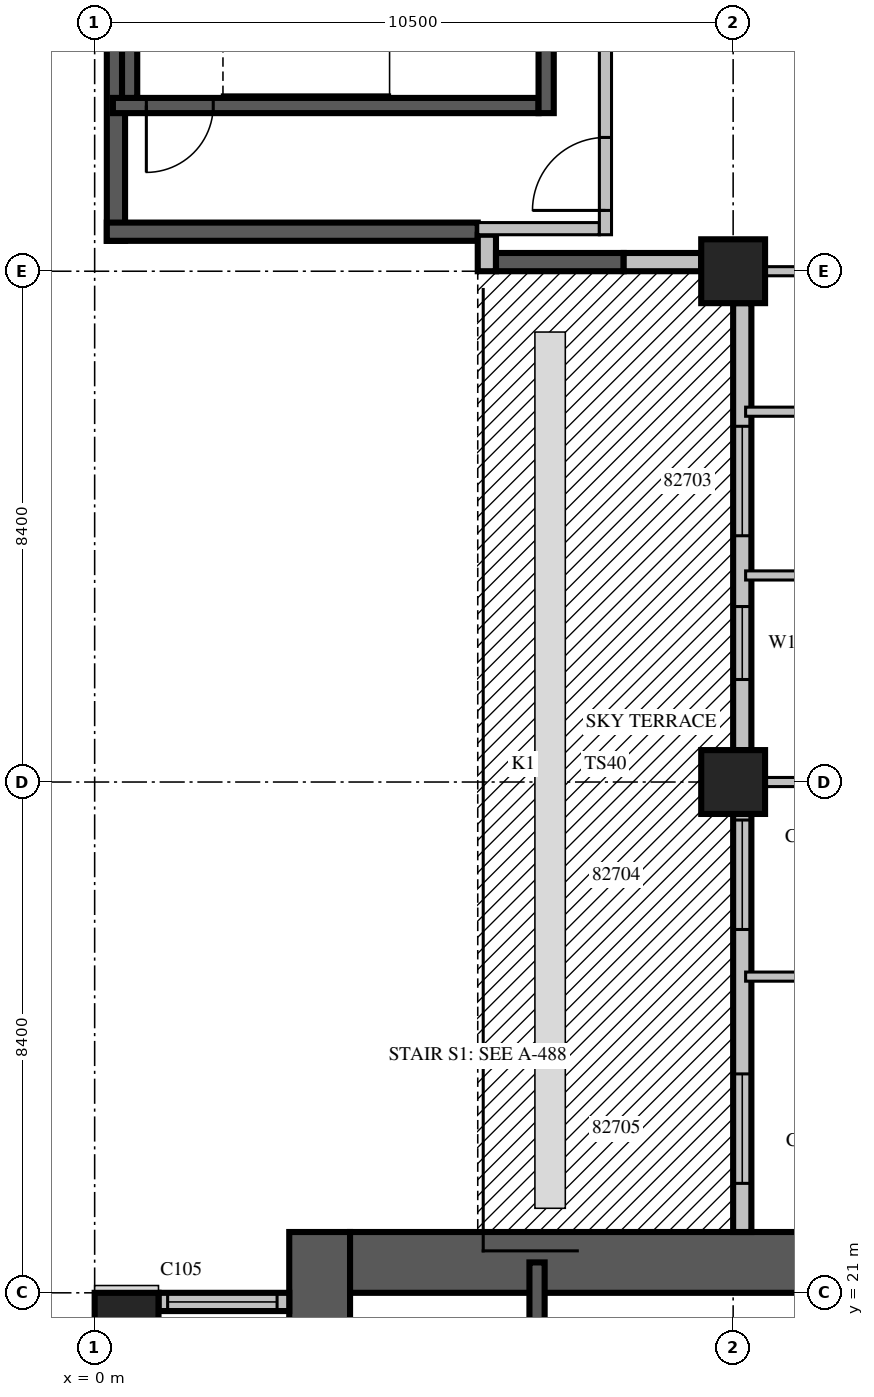
"""IFC4 building model, lengths in metres.
Left out: names, types, materials, properties, quantities, classifications, styles, units other than length and angle.
Written with IfcOpenShell. Run it as: python <this file> out.ifc"""

import sys

from ifc_helpers import new_model, si_unit, direction, frame, frame_2d, origin, origin_2d, place, context, subcontext, project, spatial, rectangle, extrude, source, transform, mapped, element, fill, save


model = new_model("IFC4")
c1 = context("Model", 3, precision=1e-05, world=origin(), true_north=direction((0.0, 1.0)))
c2 = subcontext(c1, "Body", "Model", "MODEL_VIEW")
j1 = project(units=[si_unit("LENGTHUNIT", "METRE"), si_unit("PLANEANGLEUNIT", "RADIAN")], contexts=[c1])
p1 = place(None, origin())
s1 = spatial("IfcSite", under=j1, at=p1, CompositionType="ELEMENT")
p2 = place(p1, origin())
s2 = spatial("IfcBuilding", under=s1, at=p2, CompositionType="ELEMENT")
p3 = place(p2, frame((0.0, 0.0, 124.5)))
s3 = spatial("IfcBuildingStorey", under=s2, at=p3, CompositionType="ELEMENT", Elevation=124.5)
m1 = source(origin(), c2, "Body", "SweptSolid", [
    extrude(rectangle(XDim=1.05, YDim=1.05, at=origin_2d()), origin(), (0.0, 0.0, 1.0), 4.2),
])
for number, where, z_axis, x_axis in (
    (1, (0.525, 20.475, 0.0), (0.0, 0.0, 1.0), (1.0, 0.0, 0.0)),
    (2, (10.5, 29.4, 0.0), (0.0, 0.0, 1.0), (1.0, 0.0, 0.0)),
    (3, (10.5, 37.8, 0.0), (0.0, 0.0, 1.0), (1.0, 0.0, 0.0)),
):
    element("IfcColumn", number, at=place(p3, frame(where, z_axis=z_axis, x_axis=x_axis)), inside=s3, PredefinedType="COLUMN", context=c2, shape_type="MappedRepresentation", body=[
        mapped(m1, transform((0.0, 0.0, 0.0), scale=1.0)),
    ])
m2 = source(origin(), c2, "Body", "SweptSolid", [
    extrude(rectangle(XDim=17.8, YDim=1.0, at=frame_2d((8.9, 0.0))), origin(), (0.0, 0.0, 1.0), 4.2),
])
p4 = place(p3, frame((3.7, 4.2, 0.0), z_axis=(0.0, 0.0, 1.0), x_axis=(0.0, 1.0, 0.0)))
e4 = element("IfcWall", 4, at=p4, inside=s3, PredefinedType="SHEAR", context=c2, shape_type="MappedRepresentation", body=[
    mapped(m2, transform((0.0, 0.0, 0.0), scale=1.0)),
])
m3 = source(origin(), c2, "Body", "SweptSolid", [
    extrude(rectangle(XDim=2.2, YDim=2.1, at=frame_2d((1.1, 1.05))), frame((0.0, 0.51, 0.0), z_axis=(0.0, -1.0, 0.0), x_axis=(1.0, 0.0, 0.0)), (0.0, 0.0, 1.0), 1.02),
])
p5 = place(p4, frame((4.2, 0.0, 0.0)))
e5 = element("IfcOpeningElement", 5, at=p5, cuts=e4, PredefinedType="OPENING", context=c2, shape_type="MappedRepresentation", body=[
    mapped(m3, transform((0.0, 0.0, 0.0), scale=1.0)),
])
m4 = source(origin(), c2, "Body", "SweptSolid", [
    extrude(rectangle(XDim=0.9, YDim=2.1, at=frame_2d((0.45, 1.05))), frame((0.0, 0.51, 0.0), z_axis=(0.0, -1.0, 0.0), x_axis=(1.0, 0.0, 0.0)), (0.0, 0.0, 1.0), 1.02),
])
p6 = place(p4, frame((10.95, 0.0, 0.0)))
e6 = element("IfcOpeningElement", 6, at=p6, cuts=e4, PredefinedType="OPENING", context=c2, shape_type="MappedRepresentation", body=[
    mapped(m4, transform((0.0, 0.0, 0.0), scale=1.0)),
])
m5 = source(origin(), c2, "Body", "SweptSolid", [
    extrude(rectangle(XDim=16.8, YDim=1.0, at=frame_2d((8.4, 0.0))), origin(), (0.0, 0.0, 1.0), 4.2),
])
p7 = place(p3, frame((4.2, 21.5, 0.0), z_axis=(0.0, 0.0, 1.0), x_axis=(1.0, 0.0, 0.0)))
e7 = element("IfcWall", 7, at=p7, inside=s3, PredefinedType="SHEAR", context=c2, shape_type="MappedRepresentation", body=[
    mapped(m5, transform((0.0, 0.0, 0.0), scale=1.0)),
])
m6 = source(origin(), c2, "Body", "SweptSolid", [
    extrude(rectangle(XDim=1.2, YDim=2.1, at=frame_2d((0.6, 1.05))), frame((0.0, 0.51, 0.0), z_axis=(0.0, -1.0, 0.0), x_axis=(1.0, 0.0, 0.0)), (0.0, 0.0, 1.0), 1.02),
])
p8 = place(p7, frame((7.4, 0.0, 0.0)))
e8 = element("IfcOpeningElement", 8, at=p8, cuts=e7, PredefinedType="OPENING", context=c2, shape_type="MappedRepresentation", body=[
    mapped(m6, transform((0.0, 0.0, 0.0), scale=1.0)),
])
m7 = source(origin(), c2, "Body", "SweptSolid", [
    extrude(rectangle(XDim=5.65, YDim=0.3, at=frame_2d((2.825, 0.0))), origin(), (0.0, 0.0, 1.0), 3.8),
])
p9 = place(p3, frame((0.35, 43.95, 0.0), z_axis=(0.0, 0.0, 1.0), x_axis=(0.0, -1.0, 0.0)))
e9 = element("IfcWall", 9, at=p9, inside=s3, PredefinedType="SOLIDWALL", context=c2, shape_type="MappedRepresentation", body=[
    mapped(m7, transform((0.0, 0.0, 0.0), scale=1.0)),
])
m8 = source(origin(), c2, "Body", "SweptSolid", [
    extrude(rectangle(XDim=6.1, YDim=0.3, at=frame_2d((3.05, 0.0))), origin(), (0.0, 0.0, 1.0), 3.8),
])
p10 = place(p3, frame((0.2, 38.45, 0.0), z_axis=(0.0, 0.0, 1.0), x_axis=(1.0, 0.0, 0.0)))
e10 = element("IfcWall", 10, at=p10, inside=s3, PredefinedType="SOLIDWALL", context=c2, shape_type="MappedRepresentation", body=[
    mapped(m8, transform((0.0, 0.0, 0.0), scale=1.0)),
])
p11 = place(p3, frame((6.45, 38.4, 0.0), z_axis=(0.0, 0.0, 1.0), x_axis=(0.0, -1.0, 0.0)))
e11 = element("IfcWall", 11, at=p11, inside=s3, PredefinedType="STANDARD", context=c2, shape_type="SweptSolid", body=[
    extrude(rectangle(XDim=0.6, YDim=0.3, at=frame_2d((0.3, 0.0))), origin(), (0.0, 0.0, 1.0), 3.8),
])
p12 = place(p3, frame((6.6, 37.95, 0.0), z_axis=(0.0, 0.0, 1.0), x_axis=(1.0, 0.0, 0.0)))
e12 = element("IfcWall", 12, at=p12, inside=s3, PredefinedType="SOLIDWALL", context=c2, shape_type="SweptSolid", body=[
    extrude(rectangle(XDim=2.1, YDim=0.3, at=frame_2d((1.05, 0.0))), origin(), (0.0, 0.0, 1.0), 3.8),
])
p13 = place(p3, frame((8.7, 37.95, 0.0), z_axis=(0.0, 0.0, 1.0), x_axis=(1.0, 0.0, 0.0)))
e13 = element("IfcWall", 13, at=p13, inside=s3, PredefinedType="STANDARD", context=c2, shape_type="SweptSolid", body=[
    extrude(rectangle(XDim=1.275, YDim=0.3, at=frame_2d((0.637, 0.0))), origin(), (0.0, 0.0, 1.0), 3.8),
])
m9 = source(origin(), c2, "Body", "SweptSolid", [
    extrude(rectangle(XDim=7.35, YDim=0.3, at=frame_2d((3.675, 0.0))), origin(), (0.0, 0.0, 1.0), 3.8),
])
p14 = place(p3, frame((10.65, 37.275, 0.0), z_axis=(0.0, 0.0, 1.0), x_axis=(0.0, -1.0, 0.0)))
e14 = element("IfcWall", 14, at=p14, inside=s3, PredefinedType="STANDARD", context=c2, shape_type="MappedRepresentation", body=[
    mapped(m9, transform((0.0, 0.0, 0.0), scale=1.0)),
])
m10 = source(origin(), c2, "Body", "SweptSolid", [
    extrude(rectangle(XDim=1.8, YDim=2.4, at=frame_2d((0.9, 1.2))), frame((0.0, 0.16, 0.0), z_axis=(0.0, -1.0, 0.0), x_axis=(1.0, 0.0, 0.0)), (0.0, 0.0, 1.0), 0.32),
])
p15 = place(p14, frame((2.025, 0.0, 0.0)))
e15 = element("IfcOpeningElement", 15, at=p15, cuts=e14, PredefinedType="OPENING", context=c2, shape_type="MappedRepresentation", body=[
    mapped(m10, transform((0.0, 0.0, 0.0), scale=1.0)),
])
m11 = source(origin(), c2, "Body", "SweptSolid", [
    extrude(rectangle(XDim=1.2, YDim=2.7, at=frame_2d((0.6, 1.35))), frame((0.0, 0.16, 0.0), z_axis=(0.0, -1.0, 0.0), x_axis=(1.0, 0.0, 0.0)), (0.0, 0.0, 1.0), 0.32),
])
p16 = place(p14, frame((4.989, 0.0, 0.6)))
e16 = element("IfcOpeningElement", 16, at=p16, cuts=e14, PredefinedType="OPENING", context=c2, shape_type="MappedRepresentation", body=[
    mapped(m11, transform((0.0, 0.0, 0.0), scale=1.0)),
])
m12 = source(origin(), c2, "Body", "SweptSolid", [
    extrude(rectangle(XDim=6.875, YDim=0.3, at=frame_2d((3.438, 0.0))), origin(), (0.0, 0.0, 1.0), 3.8),
])
p17 = place(p3, frame((10.65, 28.875, 0.0), z_axis=(0.0, 0.0, 1.0), x_axis=(0.0, -1.0, 0.0)))
e17 = element("IfcWall", 17, at=p17, inside=s3, PredefinedType="STANDARD", context=c2, shape_type="MappedRepresentation", body=[
    mapped(m12, transform((0.0, 0.0, 0.0), scale=1.0)),
])
p18 = place(p17, frame((0.1, 0.0, 0.0)))
e18 = element("IfcOpeningElement", 18, at=p18, cuts=e17, PredefinedType="OPENING", context=c2, shape_type="MappedRepresentation", body=[
    mapped(m10, transform((0.0, 0.0, 0.0), scale=1.0)),
])
p19 = place(p17, frame((4.275, 0.0, 0.0)))
e19 = element("IfcOpeningElement", 19, at=p19, cuts=e17, PredefinedType="OPENING", context=c2, shape_type="MappedRepresentation", body=[
    mapped(m10, transform((0.0, 0.0, 0.0), scale=1.0)),
])
m13 = source(origin(), c2, "Body", "SweptSolid", [
    extrude(rectangle(XDim=2.15, YDim=0.3, at=frame_2d((1.075, 0.0))), origin(), (0.0, 0.0, 1.0), 3.8),
])
p20 = place(p3, frame((3.2, 20.85, 0.0), z_axis=(0.0, 0.0, 1.0), x_axis=(-1.0, 0.0, 0.0)))
e20 = element("IfcWall", 20, at=p20, inside=s3, PredefinedType="STANDARD", context=c2, shape_type="MappedRepresentation", body=[
    mapped(m13, transform((0.0, 0.0, 0.0), scale=1.0)),
])
m14 = source(origin(), c2, "Body", "SweptSolid", [
    extrude(rectangle(XDim=1.8, YDim=2.7, at=frame_2d((0.9, 1.35))), frame((0.0, 0.16, 0.0), z_axis=(0.0, -1.0, 0.0), x_axis=(1.0, 0.0, 0.0)), (0.0, 0.0, 1.0), 0.32),
])
p21 = place(p20, frame((0.2, 0.0, 0.6)))
e21 = element("IfcOpeningElement", 21, at=p21, cuts=e20, PredefinedType="OPENING", context=c2, shape_type="MappedRepresentation", body=[
    mapped(m14, transform((0.0, 0.0, 0.0), scale=1.0)),
])
m15 = source(origin(), c2, "Body", "SweptSolid", [
    extrude(rectangle(XDim=6.6, YDim=0.25, at=frame_2d((3.3, 0.0))), origin(), (0.0, 0.0, 1.0), 3.8),
])
p22 = place(p3, frame((7.275, 14.9, 0.0), z_axis=(0.0, 0.0, 1.0), x_axis=(0.0, 1.0, 0.0)))
e22 = element("IfcWall", 22, at=p22, inside=s3, PredefinedType="SOLIDWALL", context=c2, shape_type="MappedRepresentation", body=[
    mapped(m15, transform((0.0, 0.0, 0.0), scale=1.0)),
])
m16 = source(origin(), c2, "Body", "SweptSolid", [
    extrude(rectangle(XDim=1.1, YDim=2.1, at=frame_2d((0.55, 1.05))), frame((0.0, 0.135, 0.0), z_axis=(0.0, -1.0, 0.0), x_axis=(1.0, 0.0, 0.0)), (0.0, 0.0, 1.0), 0.27),
])
p23 = place(p22, frame((0.15, 0.0, 0.0)))
e23 = element("IfcOpeningElement", 23, at=p23, cuts=e22, PredefinedType="OPENING", context=c2, shape_type="MappedRepresentation", body=[
    mapped(m16, transform((0.0, 0.0, 0.0), scale=1.0)),
])
m17 = source(origin(), c2, "Body", "SweptSolid", [
    extrude(rectangle(XDim=7.0, YDim=0.25, at=frame_2d((3.5, 0.0))), origin(), (0.0, 0.0, 1.0), 3.8),
])
p24 = place(p3, frame((0.3, 40.525, 0.0), z_axis=(0.0, 0.0, 1.0), x_axis=(1.0, 0.0, 0.0)))
e24 = element("IfcWall", 24, at=p24, inside=s3, PredefinedType="SOLIDWALL", context=c2, shape_type="MappedRepresentation", body=[
    mapped(m17, transform((0.0, 0.0, 0.0), scale=1.0)),
])
p25 = place(p24, frame((0.55, 0.0, 0.0)))
e25 = element("IfcOpeningElement", 25, at=p25, cuts=e24, PredefinedType="OPENING", context=c2, shape_type="MappedRepresentation", body=[
    mapped(m16, transform((0.0, 0.0, 0.0), scale=1.0)),
])
m18 = source(origin(), c2, "Body", "SweptSolid", [
    extrude(rectangle(XDim=3.45, YDim=0.25, at=frame_2d((1.725, 0.0))), origin(), (0.0, 0.0, 1.0), 3.8),
])
p26 = place(p3, frame((7.425, 40.4, 0.0), z_axis=(0.0, 0.0, 1.0), x_axis=(0.0, 1.0, 0.0)))
e26 = element("IfcWall", 26, at=p26, inside=s3, PredefinedType="SOLIDWALL", context=c2, shape_type="MappedRepresentation", body=[
    mapped(m18, transform((0.0, 0.0, 0.0), scale=1.0)),
])
m19 = source(origin(), c2, "Body", "SweptSolid", [
    extrude(rectangle(XDim=2.95, YDim=0.25, at=frame_2d((1.475, 0.0))), origin(), (0.0, 0.0, 1.0), 3.8),
])
p27 = place(p3, frame((0.575, 40.65, 0.0), z_axis=(0.0, 0.0, 1.0), x_axis=(0.0, 1.0, 0.0)))
e27 = element("IfcWall", 27, at=p27, inside=s3, PredefinedType="SOLIDWALL", context=c2, shape_type="MappedRepresentation", body=[
    mapped(m19, transform((0.0, 0.0, 0.0), scale=1.0)),
])
m20 = source(origin(), c2, "Body", "SweptSolid", [
    extrude(rectangle(XDim=2.0, YDim=0.2, at=frame_2d((1.0, 0.0))), origin(), (0.0, 0.0, 1.0), 3.8),
])
p28 = place(p3, frame((6.3, 38.5, 0.0), z_axis=(0.0, 0.0, 1.0), x_axis=(1.0, 0.0, 0.0)))
e28 = element("IfcWall", 28, at=p28, inside=s3, PredefinedType="PARTITIONING", context=c2, shape_type="MappedRepresentation", body=[
    mapped(m20, transform((0.0, 0.0, 0.0), scale=1.0)),
])
m21 = source(origin(), c2, "Body", "SweptSolid", [
    extrude(rectangle(XDim=5.45, YDim=0.2, at=frame_2d((2.725, 0.0))), origin(), (0.0, 0.0, 1.0), 3.8),
])
p29 = place(p3, frame((8.4, 38.4, 0.0), z_axis=(0.0, 0.0, 1.0), x_axis=(0.0, 1.0, 0.0)))
e29 = element("IfcWall", 29, at=p29, inside=s3, PredefinedType="PARTITIONING", context=c2, shape_type="MappedRepresentation", body=[
    mapped(m21, transform((0.0, 0.0, 0.0), scale=1.0)),
])
m22 = source(origin(), c2, "Body", "SweptSolid", [
    extrude(rectangle(XDim=1.2, YDim=2.1, at=frame_2d((0.6, 1.05))), frame((0.0, 0.11, 0.0), z_axis=(0.0, -1.0, 0.0), x_axis=(1.0, 0.0, 0.0)), (0.0, 0.0, 1.0), 0.22),
])
p30 = place(p29, frame((0.4, 0.0, 0.0)))
e30 = element("IfcOpeningElement", 30, at=p30, cuts=e29, PredefinedType="OPENING", context=c2, shape_type="MappedRepresentation", body=[
    mapped(m22, transform((0.0, 0.0, 0.0), scale=1.0)),
])
m23 = source(origin(), c2, "Body", "SweptSolid", [
    extrude(rectangle(XDim=0.9, YDim=2.1, at=frame_2d((0.45, 1.05))), frame((0.0, 0.11, 0.0), z_axis=(0.0, -1.0, 0.0), x_axis=(1.0, 0.0, 0.0)), (0.0, 0.0, 1.0), 0.22),
])
p31 = place(p29, frame((3.25, 0.0, 0.0)))
e31 = element("IfcOpeningElement", 31, at=p31, cuts=e29, PredefinedType="OPENING", context=c2, shape_type="MappedRepresentation", body=[
    mapped(m23, transform((0.0, 0.0, 0.0), scale=1.0)),
])
m24 = source(origin(), c2, "Body", "SweptSolid", [
    extrude(rectangle(XDim=4.295, YDim=0.15, at=frame_2d((2.147, 0.0))), origin(), (0.0, 0.0, 1.0), 3.8),
])
p32 = place(p3, frame((10.705, 26.2, 0.0), z_axis=(0.0, 0.0, 1.0), x_axis=(1.0, 0.0, 0.0)))
e32 = element("IfcWall", 32, at=p32, inside=s3, PredefinedType="PARTITIONING", context=c2, shape_type="MappedRepresentation", body=[
    mapped(m24, transform((0.0, 0.0, 0.0), scale=1.0)),
])
m25 = source(origin(), c2, "Body", "SweptSolid", [
    extrude(rectangle(XDim=0.9, YDim=2.1, at=frame_2d((0.45, 1.05))), frame((0.0, 0.085, 0.0), z_axis=(0.0, -1.0, 0.0), x_axis=(1.0, 0.0, 0.0)), (0.0, 0.0, 1.0), 0.17),
])
p33 = place(p32, frame((2.283, 0.0, 0.0)))
e33 = element("IfcOpeningElement", 33, at=p33, cuts=e32, PredefinedType="OPENING", context=c2, shape_type="MappedRepresentation", body=[
    mapped(m25, transform((0.0, 0.0, 0.0), scale=1.0)),
])
m26 = source(origin(), c2, "Body", "SweptSolid", [
    extrude(rectangle(XDim=3.976, YDim=0.15, at=frame_2d((1.988, 0.0))), origin(), (0.0, 0.0, 1.0), 3.8),
])
p34 = place(p3, frame((15.0, 29.4, 0.0), z_axis=(0.0, 0.0, 1.0), x_axis=(-1.0, 0.0, 0.0)))
e34 = element("IfcWall", 34, at=p34, inside=s3, PredefinedType="PARTITIONING", context=c2, shape_type="MappedRepresentation", body=[
    mapped(m26, transform((0.0, 0.0, 0.0), scale=1.0)),
])
for number, where, z_axis, x_axis in (
    (35, (15.0, 32.797, 0.0), (0.0, 0.0, 1.0), (-1.0, 0.0, 0.0)),
    (36, (15.0, 35.49, 0.0), (0.0, 0.0, 1.0), (-1.0, 0.0, 0.0)),
):
    element("IfcWall", number, at=place(p3, frame(where, z_axis=z_axis, x_axis=x_axis)), inside=s3, PredefinedType="PARTITIONING", context=c2, shape_type="MappedRepresentation", body=[
        mapped(m24, transform((0.0, 0.0, 0.0), scale=1.0)),
    ])
p35 = place(p3, frame((15.0, 37.8, 0.0), z_axis=(0.0, 0.0, 1.0), x_axis=(-1.0, 0.0, 0.0)))
e37 = element("IfcWall", 37, at=p35, inside=s3, PredefinedType="PARTITIONING", context=c2, shape_type="MappedRepresentation", body=[
    mapped(m26, transform((0.0, 0.0, 0.0), scale=1.0)),
])
m27 = source(origin(), c2, "Body", "SweptSolid", [
    extrude(rectangle(XDim=1.8, YDim=2.4, at=frame_2d((0.9, 1.2))), frame((0.0, 0.025, 0.0), z_axis=(0.0, -1.0, 0.0), x_axis=(1.0, 0.0, 0.0)), (0.0, 0.0, 1.0), 0.05),
])
p36 = place(p15, origin())
e38 = element("IfcDoor", 38, at=p36, inside=s3, OperationType="SLIDING_TO_LEFT", PredefinedType="DOOR", context=c2, shape_type="MappedRepresentation", body=[
    mapped(m27, transform((0.0, 0.0, 0.0), scale=1.0)),
])
fill(e15, e38)
m28 = source(origin(), c2, "Body", "SweptSolid", [
    extrude(rectangle(XDim=1.2, YDim=2.7, at=frame_2d((0.6, 1.35))), frame((0.0, 0.03, 0.0), z_axis=(0.0, -1.0, 0.0), x_axis=(1.0, 0.0, 0.0)), (0.0, 0.0, 1.0), 0.06),
])
p37 = place(p16, origin())
e39 = element("IfcWindow", 39, at=p37, inside=s3, PartitioningType="SINGLE_PANEL", PredefinedType="WINDOW", context=c2, shape_type="MappedRepresentation", body=[
    mapped(m28, transform((0.0, 0.0, 0.0), scale=1.0)),
])
fill(e16, e39)
p38 = place(p18, origin())
e40 = element("IfcDoor", 40, at=p38, inside=s3, OperationType="SLIDING_TO_LEFT", PredefinedType="DOOR", context=c2, shape_type="MappedRepresentation", body=[
    mapped(m27, transform((0.0, 0.0, 0.0), scale=1.0)),
])
fill(e18, e40)
p39 = place(p19, origin())
e41 = element("IfcDoor", 41, at=p39, inside=s3, OperationType="SLIDING_TO_LEFT", PredefinedType="DOOR", context=c2, shape_type="MappedRepresentation", body=[
    mapped(m27, transform((0.0, 0.0, 0.0), scale=1.0)),
])
fill(e19, e41)
m29 = source(origin(), c2, "Body", "SweptSolid", [
    extrude(rectangle(XDim=1.8, YDim=2.7, at=frame_2d((0.9, 1.35))), frame((0.0, 0.03, 0.0), z_axis=(0.0, -1.0, 0.0), x_axis=(1.0, 0.0, 0.0)), (0.0, 0.0, 1.0), 0.06),
])
p40 = place(p21, origin())
e42 = element("IfcWindow", 42, at=p40, inside=s3, PartitioningType="SINGLE_PANEL", PredefinedType="WINDOW", context=c2, shape_type="MappedRepresentation", body=[
    mapped(m29, transform((0.0, 0.0, 0.0), scale=1.0)),
])
fill(e21, e42)
m30 = source(origin(), c2, "Body", "SweptSolid", [
    extrude(rectangle(XDim=1.1, YDim=2.1, at=frame_2d((0.55, 1.05))), frame((0.0, 0.025, 0.0), z_axis=(0.0, -1.0, 0.0), x_axis=(1.0, 0.0, 0.0)), (0.0, 0.0, 1.0), 0.05),
])
p41 = place(p25, origin())
e43 = element("IfcDoor", 43, at=p41, inside=s3, OperationType="SINGLE_SWING_RIGHT", PredefinedType="DOOR", context=c2, shape_type="MappedRepresentation", body=[
    mapped(m30, transform((0.0, 0.0, 0.0), scale=1.0)),
])
fill(e25, e43)
m31 = source(origin(), c2, "Body", "SweptSolid", [
    extrude(rectangle(XDim=1.2, YDim=2.1, at=frame_2d((0.6, 1.05))), frame((0.0, 0.025, 0.0), z_axis=(0.0, -1.0, 0.0), x_axis=(1.0, 0.0, 0.0)), (0.0, 0.0, 1.0), 0.05),
])
p42 = place(p30, origin())
e44 = element("IfcDoor", 44, at=p42, inside=s3, OperationType="SINGLE_SWING_LEFT", PredefinedType="DOOR", context=c2, shape_type="MappedRepresentation", body=[
    mapped(m31, transform((0.0, 0.0, 0.0), scale=1.0)),
])
fill(e30, e44)
save(model, sys.argv[1])
